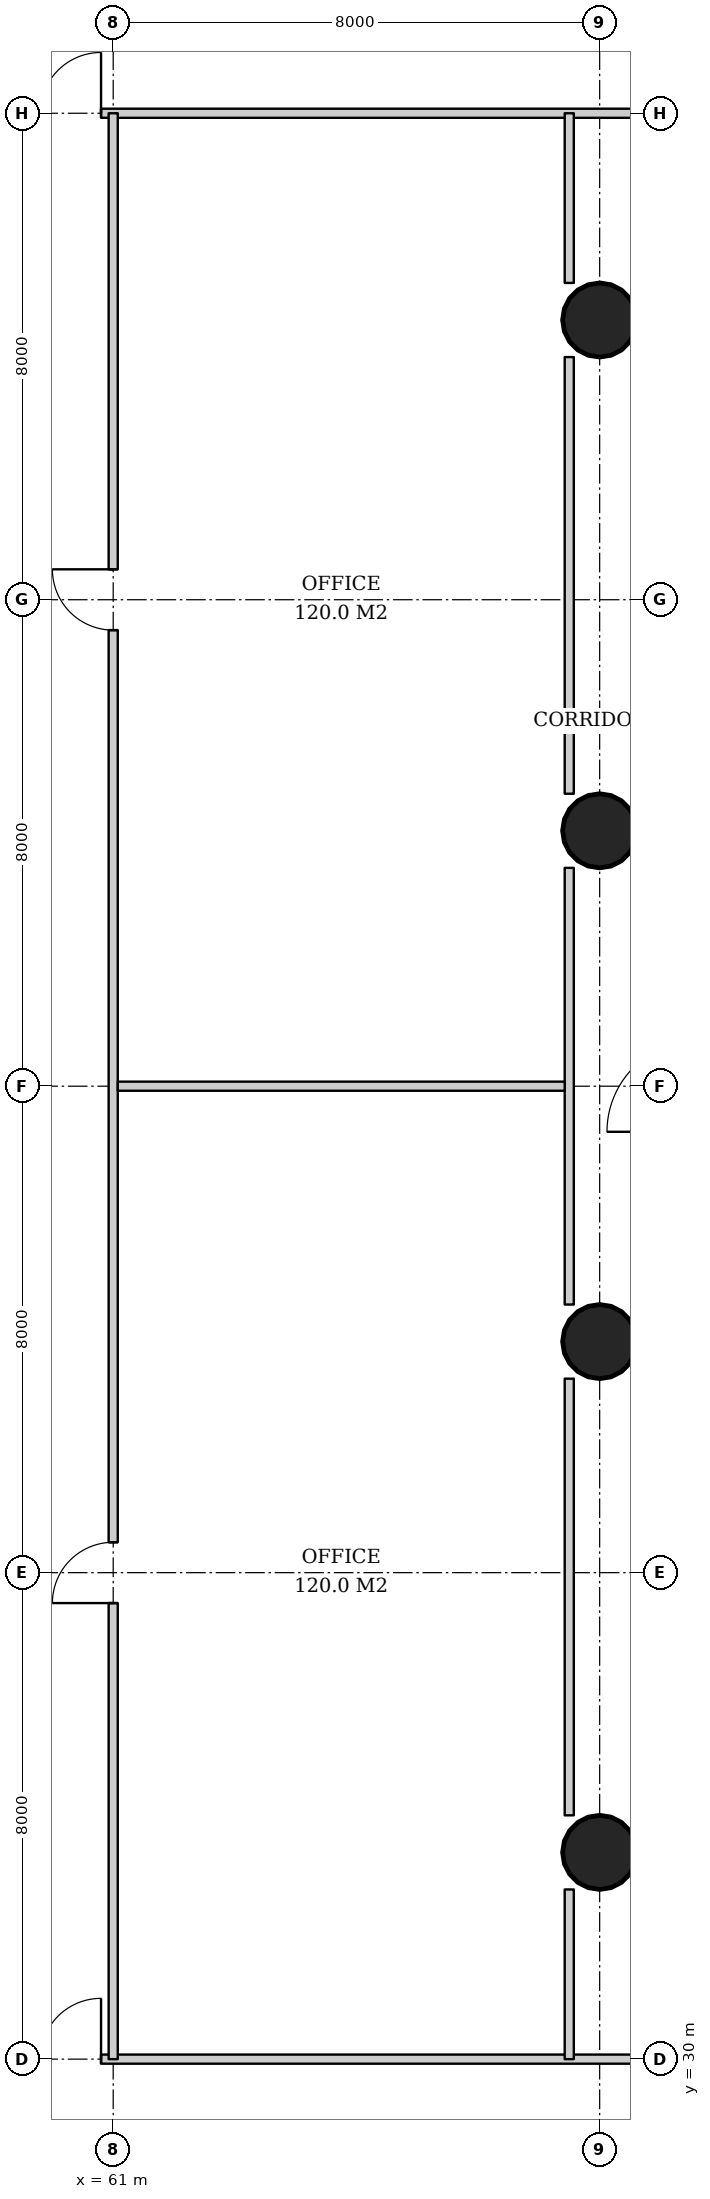
"""IFC4 building model, lengths in metres.
Left out: names, types, materials, properties, quantities, classifications, styles, units other than length and angle.
Written with IfcOpenShell. Run it as: python <this file> out.ifc"""

import sys

from ifc_helpers import new_model, si_unit, direction, frame, frame_2d, origin, origin_2d, place, context, subcontext, project, spatial, rectangle, hollow_circle, extrude, element, fill, save


model = new_model("IFC4")
c1 = context("Model", 3, precision=1e-05, world=origin(), true_north=direction((0.0, 1.0)))
c2 = subcontext(c1, "Body", "Model", "MODEL_VIEW")
j1 = project(units=[si_unit("LENGTHUNIT", "METRE"), si_unit("PLANEANGLEUNIT", "RADIAN")], contexts=[c1])
p1 = place(None, origin())
s1 = spatial("IfcSite", under=j1, at=p1, CompositionType="ELEMENT")
p2 = place(p1, origin())
s2 = spatial("IfcBuilding", under=s1, at=p2, CompositionType="ELEMENT")
p3 = place(p2, frame((0.0, 0.0, 16.0)))
s3 = spatial("IfcBuildingStorey", under=s2, at=p3, CompositionType="ELEMENT", Elevation=16.0)
for number, where, z_axis, x_axis in (
    (1, (69.0, 33.4, 0.0), (0.0, 0.0, 1.0), (1.0, 0.0, 0.0)),
    (2, (69.0, 41.8, 0.0), (0.0, 0.0, 1.0), (1.0, 0.0, 0.0)),
    (3, (69.0, 50.2, 0.0), (0.0, 0.0, 1.0), (1.0, 0.0, 0.0)),
    (4, (69.0, 58.6, 0.0), (0.0, 0.0, 1.0), (1.0, 0.0, 0.0)),
):
    element("IfcColumn", number, at=place(p3, frame(where, z_axis=z_axis, x_axis=x_axis)), inside=s3, PredefinedType="COLUMN", context=c2, shape_type="SweptSolid", body=[
        extrude(hollow_circle(Radius=0.61, WallThickness=0.04, at=origin_2d()), origin(), (0.0, 0.0, 1.0), 5.0),
    ])
p4 = place(p3, frame((19.925, 30.0, 0.0), z_axis=(0.0, 0.0, 1.0), x_axis=(1.0, 0.0, 0.0)))
e5 = element("IfcWall", 5, at=p4, inside=s3, PredefinedType="PARTITIONING", context=c2, shape_type="SweptSolid", body=[
    extrude(rectangle(XDim=50.15, YDim=0.15, at=frame_2d((25.075, 0.0))), origin(), (0.0, 0.0, 1.0), 3.688),
])
p5 = place(p4, frame((7.625, 0.0, 0.0)))
e6 = element("IfcOpeningElement", 6, at=p5, cuts=e5, PredefinedType="OPENING", context=c2, shape_type="SweptSolid", body=[
    extrude(rectangle(XDim=1.5, YDim=2.1, at=frame_2d((0.75, 1.05))), frame((0.0, 0.085, 0.0), z_axis=(0.0, -1.0, 0.0), x_axis=(1.0, 0.0, 0.0)), (0.0, 0.0, 1.0), 0.17),
])
p6 = place(p4, frame((20.375, 0.0, 0.0)))
e7 = element("IfcOpeningElement", 7, at=p6, cuts=e5, PredefinedType="OPENING", context=c2, shape_type="SweptSolid", body=[
    extrude(rectangle(XDim=1.0, YDim=2.1, at=frame_2d((0.5, 1.05))), frame((0.0, 0.085, 0.0), z_axis=(0.0, -1.0, 0.0), x_axis=(1.0, 0.0, 0.0)), (0.0, 0.0, 1.0), 0.17),
])
p7 = place(p4, frame((28.775, 0.0, 0.0)))
e8 = element("IfcOpeningElement", 8, at=p7, cuts=e5, PredefinedType="OPENING", context=c2, shape_type="SweptSolid", body=[
    extrude(rectangle(XDim=1.0, YDim=2.1, at=frame_2d((0.5, 1.05))), frame((0.0, 0.085, 0.0), z_axis=(0.0, -1.0, 0.0), x_axis=(1.0, 0.0, 0.0)), (0.0, 0.0, 1.0), 0.17),
])
p8 = place(p4, frame((39.875, 0.0, 0.0)))
e9 = element("IfcOpeningElement", 9, at=p8, cuts=e5, PredefinedType="OPENING", context=c2, shape_type="SweptSolid", body=[
    extrude(rectangle(XDim=1.0, YDim=2.1, at=frame_2d((0.5, 1.05))), frame((0.0, 0.085, 0.0), z_axis=(0.0, -1.0, 0.0), x_axis=(1.0, 0.0, 0.0)), (0.0, 0.0, 1.0), 0.17),
])
p9 = place(p3, frame((19.925, 62.0, 0.0), z_axis=(0.0, 0.0, 1.0), x_axis=(1.0, 0.0, 0.0)))
e10 = element("IfcWall", 10, at=p9, inside=s3, PredefinedType="PARTITIONING", context=c2, shape_type="SweptSolid", body=[
    extrude(rectangle(XDim=50.15, YDim=0.15, at=frame_2d((25.075, 0.0))), origin(), (0.0, 0.0, 1.0), 3.688),
])
p10 = place(p9, frame((15.875, 0.0, 0.0)))
e11 = element("IfcOpeningElement", 11, at=p10, cuts=e10, PredefinedType="OPENING", context=c2, shape_type="SweptSolid", body=[
    extrude(rectangle(XDim=1.8, YDim=2.4, at=frame_2d((0.9, 1.2))), frame((0.0, 0.085, 0.0), z_axis=(0.0, -1.0, 0.0), x_axis=(1.0, 0.0, 0.0)), (0.0, 0.0, 1.0), 0.17),
])
p11 = place(p9, frame((39.875, 0.0, 0.0)))
e12 = element("IfcOpeningElement", 12, at=p11, cuts=e10, PredefinedType="OPENING", context=c2, shape_type="SweptSolid", body=[
    extrude(rectangle(XDim=1.0, YDim=2.1, at=frame_2d((0.5, 1.05))), frame((0.0, 0.085, 0.0), z_axis=(0.0, -1.0, 0.0), x_axis=(1.0, 0.0, 0.0)), (0.0, 0.0, 1.0), 0.17),
])
p12 = place(p3, frame((61.0, 30.0, 0.0), z_axis=(0.0, 0.0, 1.0), x_axis=(0.0, 1.0, 0.0)))
e13 = element("IfcWall", 13, at=p12, inside=s3, PredefinedType="PARTITIONING", context=c2, shape_type="SweptSolid", body=[
    extrude(rectangle(XDim=32.0, YDim=0.15, at=frame_2d((16.0, 0.0))), origin(), (0.0, 0.0, 1.0), 3.688),
])
p13 = place(p12, frame((7.5, 0.0, 0.0)))
e14 = element("IfcOpeningElement", 14, at=p13, cuts=e13, PredefinedType="OPENING", context=c2, shape_type="SweptSolid", body=[
    extrude(rectangle(XDim=1.0, YDim=2.1, at=frame_2d((0.5, 1.05))), frame((0.0, 0.085, 0.0), z_axis=(0.0, -1.0, 0.0), x_axis=(1.0, 0.0, 0.0)), (0.0, 0.0, 1.0), 0.17),
])
p14 = place(p12, frame((23.5, 0.0, 0.0)))
e15 = element("IfcOpeningElement", 15, at=p14, cuts=e13, PredefinedType="OPENING", context=c2, shape_type="SweptSolid", body=[
    extrude(rectangle(XDim=1.0, YDim=2.1, at=frame_2d((0.5, 1.05))), frame((0.0, 0.085, 0.0), z_axis=(0.0, -1.0, 0.0), x_axis=(1.0, 0.0, 0.0)), (0.0, 0.0, 1.0), 0.17),
])
p15 = place(p3, frame((68.5, 30.0, 0.0), z_axis=(0.0, 0.0, 1.0), x_axis=(0.0, 1.0, 0.0)))
e16 = element("IfcWall", 16, at=p15, inside=s3, PredefinedType="PARTITIONING", context=c2, shape_type="SweptSolid", body=[
    extrude(rectangle(XDim=2.791, YDim=0.15, at=frame_2d((1.395, 0.0))), origin(), (0.0, 0.0, 1.0), 4.7),
])
p16 = place(p3, frame((68.5, 34.01, 0.0), z_axis=(0.0, 0.0, 1.0), x_axis=(0.0, 1.0, 0.0)))
e17 = element("IfcWall", 17, at=p16, inside=s3, PredefinedType="PARTITIONING", context=c2, shape_type="SweptSolid", body=[
    extrude(rectangle(XDim=7.181, YDim=0.15, at=frame_2d((3.59, 0.0))), origin(), (0.0, 0.0, 1.0), 3.93),
])
p17 = place(p3, frame((68.5, 42.409, 0.0), z_axis=(0.0, 0.0, 1.0), x_axis=(0.0, 1.0, 0.0)))
e18 = element("IfcWall", 18, at=p17, inside=s3, PredefinedType="PARTITIONING", context=c2, shape_type="SweptSolid", body=[
    extrude(rectangle(XDim=7.181, YDim=0.15, at=frame_2d((3.591, 0.0))), origin(), (0.0, 0.0, 1.0), 3.93),
])
p18 = place(p3, frame((68.5, 50.81, 0.0), z_axis=(0.0, 0.0, 1.0), x_axis=(0.0, 1.0, 0.0)))
e19 = element("IfcWall", 19, at=p18, inside=s3, PredefinedType="PARTITIONING", context=c2, shape_type="SweptSolid", body=[
    extrude(rectangle(XDim=7.181, YDim=0.15, at=frame_2d((3.59, 0.0))), origin(), (0.0, 0.0, 1.0), 3.886),
])
p19 = place(p3, frame((68.5, 59.209, 0.0), z_axis=(0.0, 0.0, 1.0), x_axis=(0.0, 1.0, 0.0)))
e20 = element("IfcWall", 20, at=p19, inside=s3, PredefinedType="PARTITIONING", context=c2, shape_type="SweptSolid", body=[
    extrude(rectangle(XDim=2.791, YDim=0.15, at=frame_2d((1.395, 0.0))), origin(), (0.0, 0.0, 1.0), 3.886),
])
p20 = place(p3, frame((61.075, 46.0, 0.0), z_axis=(0.0, 0.0, 1.0), x_axis=(1.0, 0.0, 0.0)))
e21 = element("IfcWall", 21, at=p20, inside=s3, PredefinedType="PARTITIONING", context=c2, shape_type="SweptSolid", body=[
    extrude(rectangle(XDim=7.35, YDim=0.15, at=frame_2d((3.675, 0.0))), origin(), (0.0, 0.0, 1.0), 4.7),
])
p21 = place(p8, origin())
e22 = element("IfcDoor", 22, at=p21, inside=s3, OperationType="SINGLE_SWING_RIGHT", PredefinedType="DOOR", context=c2, shape_type="SweptSolid", body=[
    extrude(rectangle(XDim=1.0, YDim=2.1, at=frame_2d((0.5, 1.05))), frame((0.0, 0.025, 0.0), z_axis=(0.0, -1.0, 0.0), x_axis=(1.0, 0.0, 0.0)), (0.0, 0.0, 1.0), 0.05),
])
fill(e9, e22)
p22 = place(p11, origin())
e23 = element("IfcDoor", 23, at=p22, inside=s3, OperationType="SINGLE_SWING_RIGHT", PredefinedType="DOOR", context=c2, shape_type="SweptSolid", body=[
    extrude(rectangle(XDim=1.0, YDim=2.1, at=frame_2d((0.5, 1.05))), frame((0.0, 0.025, 0.0), z_axis=(0.0, -1.0, 0.0), x_axis=(1.0, 0.0, 0.0)), (0.0, 0.0, 1.0), 0.05),
])
fill(e12, e23)
p23 = place(p13, origin())
e24 = element("IfcDoor", 24, at=p23, inside=s3, OperationType="SINGLE_SWING_LEFT", PredefinedType="DOOR", context=c2, shape_type="SweptSolid", body=[
    extrude(rectangle(XDim=1.0, YDim=2.1, at=frame_2d((0.5, 1.05))), frame((0.0, 0.025, 0.0), z_axis=(0.0, -1.0, 0.0), x_axis=(1.0, 0.0, 0.0)), (0.0, 0.0, 1.0), 0.05),
])
fill(e14, e24)
p24 = place(p14, origin())
e25 = element("IfcDoor", 25, at=p24, inside=s3, OperationType="SINGLE_SWING_RIGHT", PredefinedType="DOOR", context=c2, shape_type="SweptSolid", body=[
    extrude(rectangle(XDim=1.0, YDim=2.1, at=frame_2d((0.5, 1.05))), frame((0.0, 0.025, 0.0), z_axis=(0.0, -1.0, 0.0), x_axis=(1.0, 0.0, 0.0)), (0.0, 0.0, 1.0), 0.05),
])
fill(e15, e25)
save(model, sys.argv[1])
